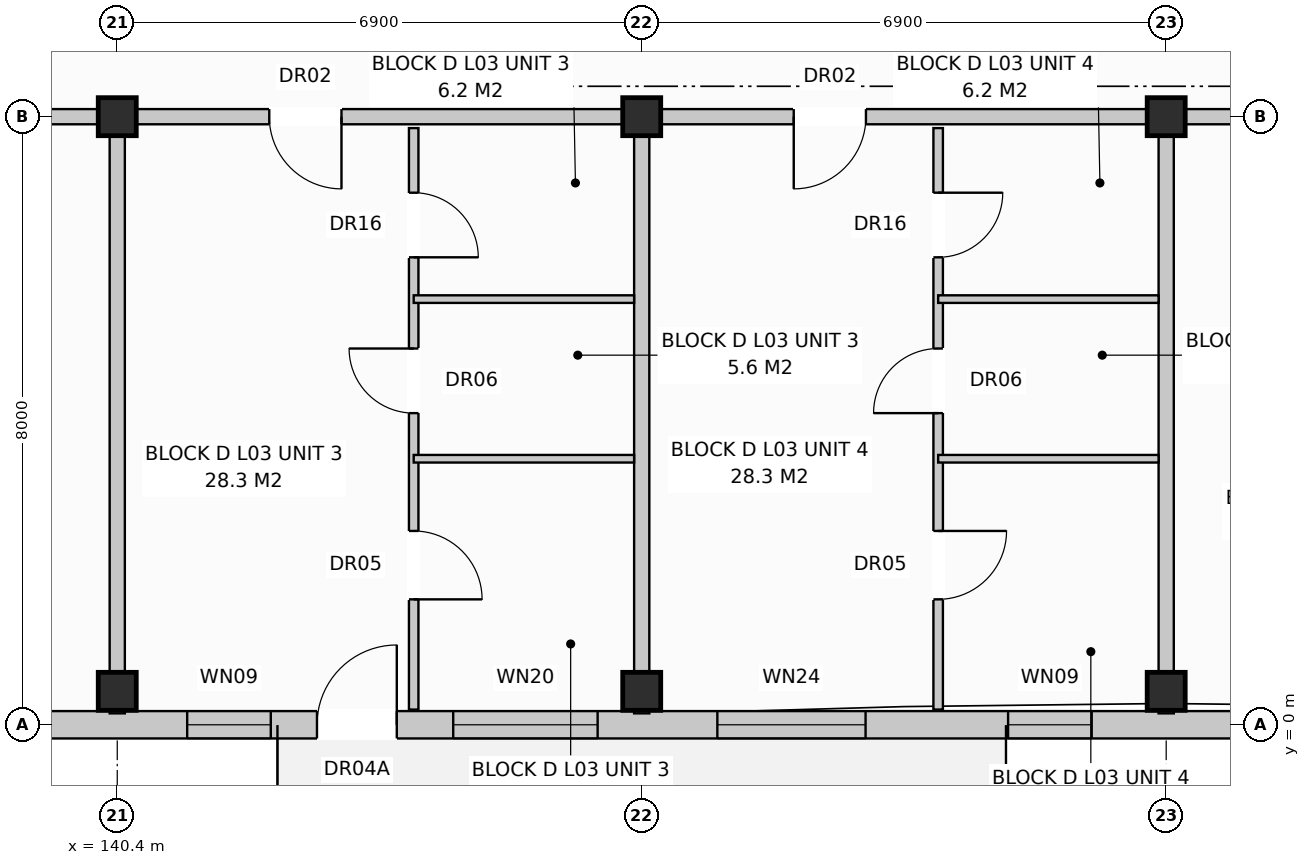
"""IFC4 building model, lengths in metres.
Left out: names, types, materials, properties, quantities, classifications, styles, units other than length and angle.
Written with IfcOpenShell. Run it as: python <this file> out.ifc"""

import sys

from ifc_helpers import new_model, si_unit, direction, frame, frame_2d, origin, origin_with_axes, origin_2d, place, context, subcontext, project, spatial, rectangle, extrude, element, fill, save


model = new_model("IFC4")
c1 = context("Model", 3, precision=1e-05, world=origin(), true_north=direction((0.0, 1.0)))
c2 = subcontext(c1, "Body", "Model", "MODEL_VIEW")
j1 = project(units=[si_unit("LENGTHUNIT", "METRE"), si_unit("PLANEANGLEUNIT", "RADIAN")], contexts=[c1])
p1 = place(None, origin())
s1 = spatial("IfcSite", under=j1, at=p1, CompositionType="ELEMENT")
p2 = place(p1, origin())
s2 = spatial("IfcBuilding", under=s1, at=p2, CompositionType="ELEMENT")
p3 = place(p2, frame((0.0, 0.0, 11.2)))
s3 = spatial("IfcBuildingStorey", under=s2, at=p3, CompositionType="ELEMENT", Elevation=11.2)
for number, where, z_axis, x_axis in (
    (1, (140.4, 0.44, 0.0), (0.0, 0.0, 1.0), (1.0, 0.0, 0.0)),
    (2, (140.4, 8.0, 0.0), (0.0, 0.0, 1.0), (1.0, 0.0, 0.0)),
    (3, (147.3, 0.44, 0.0), (0.0, 0.0, 1.0), (1.0, 0.0, 0.0)),
    (4, (147.3, 8.0, 0.0), (0.0, 0.0, 1.0), (1.0, 0.0, 0.0)),
    (5, (154.2, 0.44, 0.0), (0.0, 0.0, 1.0), (1.0, 0.0, 0.0)),
    (6, (154.2, 8.0, 0.0), (0.0, 0.0, 1.0), (1.0, 0.0, 0.0)),
):
    element("IfcColumn", number, at=place(p3, frame(where, z_axis=z_axis, x_axis=x_axis)), inside=s3, PredefinedType="COLUMN", context=c2, shape_type="SweptSolid", body=[
        extrude(rectangle(XDim=0.5, YDim=0.5, at=origin_2d()), origin(), (0.0, 0.0, 1.0), 3.2),
    ])
p4 = place(p3, frame((112.97, 0.0, 0.0), z_axis=(0.0, 0.0, 1.0), x_axis=(1.0, 0.0, 0.0)))
e7 = element("IfcWall", 7, at=p4, inside=s3, PredefinedType="STANDARD", context=c2, shape_type="SweptSolid", body=[
    extrude(rectangle(XDim=54.86, YDim=0.36, at=frame_2d((27.43, 0.0))), origin(), (0.0, 0.0, 1.0), 2.94),
])
p5 = place(p4, frame((3.764, 0.0, 0.0)))
e8 = element("IfcOpeningElement", 8, at=p5, cuts=e7, PredefinedType="OPENING", context=c2, shape_type="SweptSolid", body=[
    extrude(rectangle(XDim=1.05, YDim=2.12, at=frame_2d((0.525, 1.06))), frame((0.0, 0.192, 0.0), z_axis=(0.0, -1.0, 0.0), x_axis=(1.0, 0.0, 0.0)), (0.0, 0.0, 1.0), 0.384),
])
p6 = place(p4, frame((16.558, 0.0, 0.0)))
e9 = element("IfcOpeningElement", 9, at=p6, cuts=e7, PredefinedType="OPENING", context=c2, shape_type="SweptSolid", body=[
    extrude(rectangle(XDim=1.05, YDim=2.12, at=frame_2d((0.525, 1.06))), frame((0.0, 0.192, 0.0), z_axis=(0.0, -1.0, 0.0), x_axis=(1.0, 0.0, 0.0)), (0.0, 0.0, 1.0), 0.384),
])
p7 = place(p4, frame((30.058, 0.0, 0.0)))
e10 = element("IfcOpeningElement", 10, at=p7, cuts=e7, PredefinedType="OPENING", context=c2, shape_type="SweptSolid", body=[
    extrude(rectangle(XDim=1.05, YDim=2.12, at=frame_2d((0.525, 1.06))), frame((0.0, 0.192, 0.0), z_axis=(0.0, -1.0, 0.0), x_axis=(1.0, 0.0, 0.0)), (0.0, 0.0, 1.0), 0.384),
])
p8 = place(p4, frame((45.158, 0.0, 0.0)))
e11 = element("IfcOpeningElement", 11, at=p8, cuts=e7, PredefinedType="OPENING", context=c2, shape_type="SweptSolid", body=[
    extrude(rectangle(XDim=1.05, YDim=2.12, at=frame_2d((0.525, 1.06))), frame((0.0, 0.192, 0.0), z_axis=(0.0, -1.0, 0.0), x_axis=(1.0, 0.0, 0.0)), (0.0, 0.0, 1.0), 0.384),
])
p9 = place(p4, frame((1.6, 0.0, 0.8)))
e12 = element("IfcOpeningElement", 12, at=p9, cuts=e7, PredefinedType="OPENING", context=c2, shape_type="SweptSolid", body=[
    extrude(rectangle(XDim=1.8, YDim=1.7, at=frame_2d((0.9, 0.85))), frame((0.0, 0.192, 0.0), z_axis=(0.0, -1.0, 0.0), x_axis=(1.0, 0.0, 0.0)), (0.0, 0.0, 1.0), 0.384),
])
p10 = place(p4, frame((7.65, 0.0, 0.72)))
e13 = element("IfcOpeningElement", 13, at=p10, cuts=e7, PredefinedType="OPENING", context=c2, shape_type="SweptSolid", body=[
    extrude(rectangle(XDim=1.1, YDim=1.5, at=frame_2d((0.55, 0.75))), frame((0.0, 0.192, 0.0), z_axis=(0.0, -1.0, 0.0), x_axis=(1.0, 0.0, 0.0)), (0.0, 0.0, 1.0), 0.384),
])
p11 = place(p4, frame((10.425, 0.0, 0.8)))
e14 = element("IfcOpeningElement", 14, at=p11, cuts=e7, PredefinedType="OPENING", context=c2, shape_type="SweptSolid", body=[
    extrude(rectangle(XDim=1.95, YDim=1.65, at=frame_2d((0.975, 0.825))), frame((0.0, 0.192, 0.0), z_axis=(0.0, -1.0, 0.0), x_axis=(1.0, 0.0, 0.0)), (0.0, 0.0, 1.0), 0.384),
])
p12 = place(p4, frame((14.85, 0.0, 0.72)))
e15 = element("IfcOpeningElement", 15, at=p12, cuts=e7, PredefinedType="OPENING", context=c2, shape_type="SweptSolid", body=[
    extrude(rectangle(XDim=1.1, YDim=1.5, at=frame_2d((0.55, 0.75))), frame((0.0, 0.192, 0.0), z_axis=(0.0, -1.0, 0.0), x_axis=(1.0, 0.0, 0.0)), (0.0, 0.0, 1.0), 0.384),
])
p13 = place(p4, frame((18.15, 0.0, 0.72)))
e16 = element("IfcOpeningElement", 16, at=p13, cuts=e7, PredefinedType="OPENING", context=c2, shape_type="SweptSolid", body=[
    extrude(rectangle(XDim=1.9, YDim=1.85, at=frame_2d((0.95, 0.925))), frame((0.0, 0.192, 0.0), z_axis=(0.0, -1.0, 0.0), x_axis=(1.0, 0.0, 0.0)), (0.0, 0.0, 1.0), 0.384),
])
p14 = place(p4, frame((24.25, 0.0, 0.72)))
e17 = element("IfcOpeningElement", 17, at=p14, cuts=e7, PredefinedType="OPENING", context=c2, shape_type="SweptSolid", body=[
    extrude(rectangle(XDim=1.1, YDim=1.5, at=frame_2d((0.55, 0.75))), frame((0.0, 0.192, 0.0), z_axis=(0.0, -1.0, 0.0), x_axis=(1.0, 0.0, 0.0)), (0.0, 0.0, 1.0), 0.384),
])
p15 = place(p4, frame((28.35, 0.0, 0.72)))
e18 = element("IfcOpeningElement", 18, at=p15, cuts=e7, PredefinedType="OPENING", context=c2, shape_type="SweptSolid", body=[
    extrude(rectangle(XDim=1.1, YDim=1.5, at=frame_2d((0.55, 0.75))), frame((0.0, 0.192, 0.0), z_axis=(0.0, -1.0, 0.0), x_axis=(1.0, 0.0, 0.0)), (0.0, 0.0, 1.0), 0.384),
])
p16 = place(p4, frame((31.85, 0.0, 0.72)))
e19 = element("IfcOpeningElement", 19, at=p16, cuts=e7, PredefinedType="OPENING", context=c2, shape_type="SweptSolid", body=[
    extrude(rectangle(XDim=1.9, YDim=1.85, at=frame_2d((0.95, 0.925))), frame((0.0, 0.192, 0.0), z_axis=(0.0, -1.0, 0.0), x_axis=(1.0, 0.0, 0.0)), (0.0, 0.0, 1.0), 0.384),
])
p17 = place(p4, frame((35.325, 0.0, 0.8)))
e20 = element("IfcOpeningElement", 20, at=p17, cuts=e7, PredefinedType="OPENING", context=c2, shape_type="SweptSolid", body=[
    extrude(rectangle(XDim=1.95, YDim=1.65, at=frame_2d((0.975, 0.825))), frame((0.0, 0.192, 0.0), z_axis=(0.0, -1.0, 0.0), x_axis=(1.0, 0.0, 0.0)), (0.0, 0.0, 1.0), 0.384),
])
p18 = place(p4, frame((39.15, 0.0, 0.72)))
e21 = element("IfcOpeningElement", 21, at=p18, cuts=e7, PredefinedType="OPENING", context=c2, shape_type="SweptSolid", body=[
    extrude(rectangle(XDim=1.1, YDim=1.5, at=frame_2d((0.55, 0.75))), frame((0.0, 0.192, 0.0), z_axis=(0.0, -1.0, 0.0), x_axis=(1.0, 0.0, 0.0)), (0.0, 0.0, 1.0), 0.384),
])
p19 = place(p4, frame((42.95, 0.0, 0.8)))
e22 = element("IfcOpeningElement", 22, at=p19, cuts=e7, PredefinedType="OPENING", context=c2, shape_type="SweptSolid", body=[
    extrude(rectangle(XDim=1.9, YDim=1.85, at=frame_2d((0.95, 0.925))), frame((0.0, 0.192, 0.0), z_axis=(0.0, -1.0, 0.0), x_axis=(1.0, 0.0, 0.0)), (0.0, 0.0, 1.0), 0.384),
])
p20 = place(p4, frame((48.583, 0.0, 0.8)))
e23 = element("IfcOpeningElement", 23, at=p20, cuts=e7, PredefinedType="OPENING", context=c2, shape_type="SweptSolid", body=[
    extrude(rectangle(XDim=1.95, YDim=1.65, at=frame_2d((0.975, 0.825))), frame((0.0, 0.192, 0.0), z_axis=(0.0, -1.0, 0.0), x_axis=(1.0, 0.0, 0.0)), (0.0, 0.0, 1.0), 0.384),
])
p21 = place(p4, frame((52.25, 0.0, 0.72)))
e24 = element("IfcOpeningElement", 24, at=p21, cuts=e7, PredefinedType="OPENING", context=c2, shape_type="SweptSolid", body=[
    extrude(rectangle(XDim=1.1, YDim=1.5, at=frame_2d((0.55, 0.75))), frame((0.0, 0.192, 0.0), z_axis=(0.0, -1.0, 0.0), x_axis=(1.0, 0.0, 0.0)), (0.0, 0.0, 1.0), 0.384),
])
p22 = place(p3, frame((140.4, 7.85, 0.0), z_axis=(0.0, 0.0, 1.0), x_axis=(0.0, -1.0, 0.0)))
e25 = element("IfcWall", 25, at=p22, inside=s3, PredefinedType="PARTITIONING", context=c2, shape_type="SweptSolid", body=[
    extrude(rectangle(XDim=7.7, YDim=0.2, at=frame_2d((3.85, 0.0))), origin(), (0.0, 0.0, 1.0), 2.94),
])
p23 = place(p3, frame((126.6, 8.0, 0.0), z_axis=(0.0, 0.0, 1.0), x_axis=(1.0, 0.0, 0.0)))
e26 = element("IfcWall", 26, at=p23, inside=s3, PredefinedType="PARTITIONING", context=c2, shape_type="SweptSolid", body=[
    extrude(rectangle(XDim=13.8, YDim=0.2, at=frame_2d((6.9, 0.0))), origin(), (0.0, 0.0, 1.0), 2.38),
])
p24 = place(p23, frame((9.6, 0.0, 0.0)))
e27 = element("IfcOpeningElement", 27, at=p24, cuts=e26, PredefinedType="OPENING", context=c2, shape_type="SweptSolid", body=[
    extrude(rectangle(XDim=0.95, YDim=2.15, at=frame_2d((0.475, 1.075))), frame((0.0, 0.112, 0.0), z_axis=(0.0, -1.0, 0.0), x_axis=(1.0, 0.0, 0.0)), (0.0, 0.0, 1.0), 0.224),
])
p25 = place(p3, frame((147.3, 7.85, 0.0), z_axis=(0.0, 0.0, 1.0), x_axis=(0.0, -1.0, 0.0)))
e28 = element("IfcWall", 28, at=p25, inside=s3, PredefinedType="PARTITIONING", context=c2, shape_type="SweptSolid", body=[
    extrude(rectangle(XDim=7.7, YDim=0.2, at=frame_2d((3.85, 0.0))), origin(), (0.0, 0.0, 1.0), 2.94),
])
p26 = place(p3, frame((140.4, 8.0, 0.0), z_axis=(0.0, 0.0, 1.0), x_axis=(1.0, 0.0, 0.0)))
e29 = element("IfcWall", 29, at=p26, inside=s3, PredefinedType="PARTITIONING", context=c2, shape_type="SweptSolid", body=[
    extrude(rectangle(XDim=6.9, YDim=0.2, at=frame_2d((3.45, 0.0))), origin(), (0.0, 0.0, 1.0), 2.38),
])
p27 = place(p26, frame((2.0, 0.0, 0.0)))
e30 = element("IfcOpeningElement", 30, at=p27, cuts=e29, PredefinedType="OPENING", context=c2, shape_type="SweptSolid", body=[
    extrude(rectangle(XDim=0.95, YDim=2.15, at=frame_2d((0.475, 1.075))), frame((0.0, 0.112, 0.0), z_axis=(0.0, -1.0, 0.0), x_axis=(1.0, 0.0, 0.0)), (0.0, 0.0, 1.0), 0.224),
])
p28 = place(p3, frame((144.3, 7.85, 0.0), z_axis=(0.0, 0.0, 1.0), x_axis=(0.0, -1.0, 0.0)))
e31 = element("IfcWall", 31, at=p28, inside=s3, PredefinedType="PARTITIONING", context=c2, shape_type="SweptSolid", body=[
    extrude(rectangle(XDim=7.65, YDim=0.125, at=frame_2d((3.825, 0.0))), origin(), (0.0, 0.0, 1.0), 2.94),
])
p29 = place(p28, frame((0.85, 0.0, 0.0)))
e32 = element("IfcOpeningElement", 32, at=p29, cuts=e31, PredefinedType="OPENING", context=c2, shape_type="SweptSolid", body=[
    extrude(rectangle(XDim=0.85, YDim=2.1, at=frame_2d((0.425, 1.05))), frame((0.0, 0.074, 0.0), z_axis=(0.0, -1.0, 0.0), x_axis=(1.0, 0.0, 0.0)), (0.0, 0.0, 1.0), 0.149),
])
p30 = place(p28, frame((2.9, 0.0, 0.0)))
e33 = element("IfcOpeningElement", 33, at=p30, cuts=e31, PredefinedType="OPENING", context=c2, shape_type="SweptSolid", body=[
    extrude(rectangle(XDim=0.85, YDim=2.05, at=frame_2d((0.425, 1.025))), frame((0.0, 0.074, 0.0), z_axis=(0.0, -1.0, 0.0), x_axis=(1.0, 0.0, 0.0)), (0.0, 0.0, 1.0), 0.149),
])
p31 = place(p28, frame((5.3, 0.0, 0.0)))
e34 = element("IfcOpeningElement", 34, at=p31, cuts=e31, PredefinedType="OPENING", context=c2, shape_type="SweptSolid", body=[
    extrude(rectangle(XDim=0.9, YDim=2.1, at=frame_2d((0.45, 1.05))), frame((0.0, 0.074, 0.0), z_axis=(0.0, -1.0, 0.0), x_axis=(1.0, 0.0, 0.0)), (0.0, 0.0, 1.0), 0.149),
])
for number, where, z_axis, x_axis in (
    (35, (144.3, 5.6, 0.0), (0.0, 0.0, 1.0), (1.0, 0.0, 0.0)),
    (36, (144.3, 3.5, 0.0), (0.0, 0.0, 1.0), (1.0, 0.0, 0.0)),
):
    element("IfcWall", number, at=place(p3, frame(where, z_axis=z_axis, x_axis=x_axis)), inside=s3, PredefinedType="PARTITIONING", context=c2, shape_type="SweptSolid", body=[
        extrude(rectangle(XDim=2.9, YDim=0.1, at=frame_2d((1.45, 0.0))), origin(), (0.0, 0.0, 1.0), 2.94),
    ])
p32 = place(p3, frame((154.2, 7.85, 0.0), z_axis=(0.0, 0.0, 1.0), x_axis=(0.0, -1.0, 0.0)))
e37 = element("IfcWall", 37, at=p32, inside=s3, PredefinedType="PARTITIONING", context=c2, shape_type="SweptSolid", body=[
    extrude(rectangle(XDim=7.7, YDim=0.2, at=frame_2d((3.85, 0.0))), origin(), (0.0, 0.0, 1.0), 2.94),
])
p33 = place(p3, frame((147.3, 8.0, 0.0), z_axis=(0.0, 0.0, 1.0), x_axis=(1.0, 0.0, 0.0)))
e38 = element("IfcWall", 38, at=p33, inside=s3, PredefinedType="PARTITIONING", context=c2, shape_type="SweptSolid", body=[
    extrude(rectangle(XDim=6.9, YDim=0.2, at=frame_2d((3.45, 0.0))), origin(), (0.0, 0.0, 1.0), 2.38),
])
p34 = place(p33, frame((2.0, 0.0, 0.0)))
e39 = element("IfcOpeningElement", 39, at=p34, cuts=e38, PredefinedType="OPENING", context=c2, shape_type="SweptSolid", body=[
    extrude(rectangle(XDim=0.95, YDim=2.15, at=frame_2d((0.475, 1.075))), frame((0.0, 0.112, 0.0), z_axis=(0.0, -1.0, 0.0), x_axis=(1.0, 0.0, 0.0)), (0.0, 0.0, 1.0), 0.224),
])
p35 = place(p3, frame((151.2, 7.85, 0.0), z_axis=(0.0, 0.0, 1.0), x_axis=(0.0, -1.0, 0.0)))
e40 = element("IfcWall", 40, at=p35, inside=s3, PredefinedType="PARTITIONING", context=c2, shape_type="SweptSolid", body=[
    extrude(rectangle(XDim=7.65, YDim=0.125, at=frame_2d((3.825, 0.0))), origin(), (0.0, 0.0, 1.0), 2.94),
])
p36 = place(p35, frame((0.85, 0.0, 0.0)))
e41 = element("IfcOpeningElement", 41, at=p36, cuts=e40, PredefinedType="OPENING", context=c2, shape_type="SweptSolid", body=[
    extrude(rectangle(XDim=0.85, YDim=2.1, at=frame_2d((0.425, 1.05))), frame((0.0, 0.074, 0.0), z_axis=(0.0, -1.0, 0.0), x_axis=(1.0, 0.0, 0.0)), (0.0, 0.0, 1.0), 0.149),
])
p37 = place(p35, frame((2.9, 0.0, 0.0)))
e42 = element("IfcOpeningElement", 42, at=p37, cuts=e40, PredefinedType="OPENING", context=c2, shape_type="SweptSolid", body=[
    extrude(rectangle(XDim=0.85, YDim=2.05, at=frame_2d((0.425, 1.025))), frame((0.0, 0.074, 0.0), z_axis=(0.0, -1.0, 0.0), x_axis=(1.0, 0.0, 0.0)), (0.0, 0.0, 1.0), 0.149),
])
p38 = place(p35, frame((5.3, 0.0, 0.0)))
e43 = element("IfcOpeningElement", 43, at=p38, cuts=e40, PredefinedType="OPENING", context=c2, shape_type="SweptSolid", body=[
    extrude(rectangle(XDim=0.9, YDim=2.1, at=frame_2d((0.45, 1.05))), frame((0.0, 0.074, 0.0), z_axis=(0.0, -1.0, 0.0), x_axis=(1.0, 0.0, 0.0)), (0.0, 0.0, 1.0), 0.149),
])
for number, where, z_axis, x_axis in (
    (44, (151.2, 5.6, 0.0), (0.0, 0.0, 1.0), (1.0, 0.0, 0.0)),
    (45, (151.2, 3.5, 0.0), (0.0, 0.0, 1.0), (1.0, 0.0, 0.0)),
):
    element("IfcWall", number, at=place(p3, frame(where, z_axis=z_axis, x_axis=x_axis)), inside=s3, PredefinedType="PARTITIONING", context=c2, shape_type="SweptSolid", body=[
        extrude(rectangle(XDim=2.9, YDim=0.1, at=frame_2d((1.45, 0.0))), origin(), (0.0, 0.0, 1.0), 2.94),
    ])
p39 = place(p3, frame((154.2, 8.0, 0.0), z_axis=(0.0, 0.0, 1.0), x_axis=(1.0, 0.0, 0.0)))
e46 = element("IfcWall", 46, at=p39, inside=s3, PredefinedType="PARTITIONING", context=c2, shape_type="SweptSolid", body=[
    extrude(rectangle(XDim=13.8, YDim=0.2, at=frame_2d((6.9, 0.0))), origin(), (0.0, 0.0, 1.0), 2.38),
])
p40 = place(p39, frame((2.4, 0.0, 0.0)))
e47 = element("IfcOpeningElement", 47, at=p40, cuts=e46, PredefinedType="OPENING", context=c2, shape_type="SweptSolid", body=[
    extrude(rectangle(XDim=0.95, YDim=2.15, at=frame_2d((0.475, 1.075))), frame((0.0, 0.112, 0.0), z_axis=(0.0, -1.0, 0.0), x_axis=(1.0, 0.0, 0.0)), (0.0, 0.0, 1.0), 0.224),
])
p41 = place(p7, origin_with_axes())
e48 = element("IfcDoor", 48, at=p41, inside=s3, OperationType="SINGLE_SWING_RIGHT", PredefinedType="DOOR", context=c2, shape_type="SweptSolid", body=[
    extrude(rectangle(XDim=1.05, YDim=2.12, at=frame_2d((0.525, 1.06))), frame((0.0, 0.025, 0.0), z_axis=(0.0, -1.0, 0.0), x_axis=(1.0, 0.0, 0.0)), (0.0, 0.0, 1.0), 0.05),
])
fill(e10, e48)
p42 = place(p15, origin_with_axes())
e49 = element("IfcWindow", 49, at=p42, inside=s3, PartitioningType="SINGLE_PANEL", PredefinedType="WINDOW", context=c2, shape_type="SweptSolid", body=[
    extrude(rectangle(XDim=1.1, YDim=1.5, at=frame_2d((0.55, 0.75))), frame((0.0, 0.03, 0.0), z_axis=(0.0, -1.0, 0.0), x_axis=(1.0, 0.0, 0.0)), (0.0, 0.0, 1.0), 0.06),
])
fill(e18, e49)
p43 = place(p16, origin_with_axes())
e50 = element("IfcWindow", 50, at=p43, inside=s3, PartitioningType="SINGLE_PANEL", PredefinedType="WINDOW", context=c2, shape_type="SweptSolid", body=[
    extrude(rectangle(XDim=1.9, YDim=1.85, at=frame_2d((0.95, 0.925))), frame((0.0, 0.03, 0.0), z_axis=(0.0, -1.0, 0.0), x_axis=(1.0, 0.0, 0.0)), (0.0, 0.0, 1.0), 0.06),
])
fill(e19, e50)
p44 = place(p17, origin_with_axes())
e51 = element("IfcWindow", 51, at=p44, inside=s3, PartitioningType="SINGLE_PANEL", PredefinedType="WINDOW", context=c2, shape_type="SweptSolid", body=[
    extrude(rectangle(XDim=1.95, YDim=1.65, at=frame_2d((0.975, 0.825))), frame((0.0, 0.03, 0.0), z_axis=(0.0, -1.0, 0.0), x_axis=(1.0, 0.0, 0.0)), (0.0, 0.0, 1.0), 0.06),
])
fill(e20, e51)
p45 = place(p18, origin_with_axes())
e52 = element("IfcWindow", 52, at=p45, inside=s3, PartitioningType="SINGLE_PANEL", PredefinedType="WINDOW", context=c2, shape_type="SweptSolid", body=[
    extrude(rectangle(XDim=1.1, YDim=1.5, at=frame_2d((0.55, 0.75))), frame((0.0, 0.03, 0.0), z_axis=(0.0, -1.0, 0.0), x_axis=(1.0, 0.0, 0.0)), (0.0, 0.0, 1.0), 0.06),
])
fill(e21, e52)
p46 = place(p27, frame((0.95, 0.0, 0.0), z_axis=(0.0, 0.0, 1.0), x_axis=(-1.0, 0.0, 0.0)))
e53 = element("IfcDoor", 53, at=p46, inside=s3, OperationType="SINGLE_SWING_RIGHT", PredefinedType="DOOR", context=c2, shape_type="SweptSolid", body=[
    extrude(rectangle(XDim=0.95, YDim=2.15, at=frame_2d((0.475, 1.075))), frame((0.0, 0.025, 0.0), z_axis=(0.0, -1.0, 0.0), x_axis=(1.0, 0.0, 0.0)), (0.0, 0.0, 1.0), 0.05),
])
fill(e30, e53)
p47 = place(p29, origin_with_axes())
e54 = element("IfcDoor", 54, at=p47, inside=s3, OperationType="SINGLE_SWING_RIGHT", PredefinedType="DOOR", context=c2, shape_type="SweptSolid", body=[
    extrude(rectangle(XDim=0.85, YDim=2.1, at=frame_2d((0.425, 1.05))), frame((0.0, 0.025, 0.0), z_axis=(0.0, -1.0, 0.0), x_axis=(1.0, 0.0, 0.0)), (0.0, 0.0, 1.0), 0.05),
])
fill(e32, e54)
p48 = place(p30, frame((0.85, 0.0, 0.0), z_axis=(0.0, 0.0, 1.0), x_axis=(-1.0, 0.0, 0.0)))
e55 = element("IfcDoor", 55, at=p48, inside=s3, OperationType="SINGLE_SWING_LEFT", PredefinedType="DOOR", context=c2, shape_type="SweptSolid", body=[
    extrude(rectangle(XDim=0.85, YDim=2.05, at=frame_2d((0.425, 1.025))), frame((0.0, 0.025, 0.0), z_axis=(0.0, -1.0, 0.0), x_axis=(1.0, 0.0, 0.0)), (0.0, 0.0, 1.0), 0.05),
])
fill(e33, e55)
p49 = place(p31, origin_with_axes())
e56 = element("IfcDoor", 56, at=p49, inside=s3, OperationType="SINGLE_SWING_RIGHT", PredefinedType="DOOR", context=c2, shape_type="SweptSolid", body=[
    extrude(rectangle(XDim=0.9, YDim=2.1, at=frame_2d((0.45, 1.05))), frame((0.0, 0.025, 0.0), z_axis=(0.0, -1.0, 0.0), x_axis=(1.0, 0.0, 0.0)), (0.0, 0.0, 1.0), 0.05),
])
fill(e34, e56)
p50 = place(p34, frame((0.95, 0.0, 0.0), z_axis=(0.0, 0.0, 1.0), x_axis=(-1.0, 0.0, 0.0)))
e57 = element("IfcDoor", 57, at=p50, inside=s3, OperationType="SINGLE_SWING_LEFT", PredefinedType="DOOR", context=c2, shape_type="SweptSolid", body=[
    extrude(rectangle(XDim=0.95, YDim=2.15, at=frame_2d((0.475, 1.075))), frame((0.0, 0.025, 0.0), z_axis=(0.0, -1.0, 0.0), x_axis=(1.0, 0.0, 0.0)), (0.0, 0.0, 1.0), 0.05),
])
fill(e39, e57)
p51 = place(p36, origin_with_axes())
e58 = element("IfcDoor", 58, at=p51, inside=s3, OperationType="SINGLE_SWING_LEFT", PredefinedType="DOOR", context=c2, shape_type="SweptSolid", body=[
    extrude(rectangle(XDim=0.85, YDim=2.1, at=frame_2d((0.425, 1.05))), frame((0.0, 0.025, 0.0), z_axis=(0.0, -1.0, 0.0), x_axis=(1.0, 0.0, 0.0)), (0.0, 0.0, 1.0), 0.05),
])
fill(e41, e58)
p52 = place(p37, frame((0.85, 0.0, 0.0), z_axis=(0.0, 0.0, 1.0), x_axis=(-1.0, 0.0, 0.0)))
e59 = element("IfcDoor", 59, at=p52, inside=s3, OperationType="SINGLE_SWING_RIGHT", PredefinedType="DOOR", context=c2, shape_type="SweptSolid", body=[
    extrude(rectangle(XDim=0.85, YDim=2.05, at=frame_2d((0.425, 1.025))), frame((0.0, 0.025, 0.0), z_axis=(0.0, -1.0, 0.0), x_axis=(1.0, 0.0, 0.0)), (0.0, 0.0, 1.0), 0.05),
])
fill(e42, e59)
p53 = place(p38, origin_with_axes())
e60 = element("IfcDoor", 60, at=p53, inside=s3, OperationType="SINGLE_SWING_LEFT", PredefinedType="DOOR", context=c2, shape_type="SweptSolid", body=[
    extrude(rectangle(XDim=0.9, YDim=2.1, at=frame_2d((0.45, 1.05))), frame((0.0, 0.025, 0.0), z_axis=(0.0, -1.0, 0.0), x_axis=(1.0, 0.0, 0.0)), (0.0, 0.0, 1.0), 0.05),
])
fill(e43, e60)
save(model, sys.argv[1])
